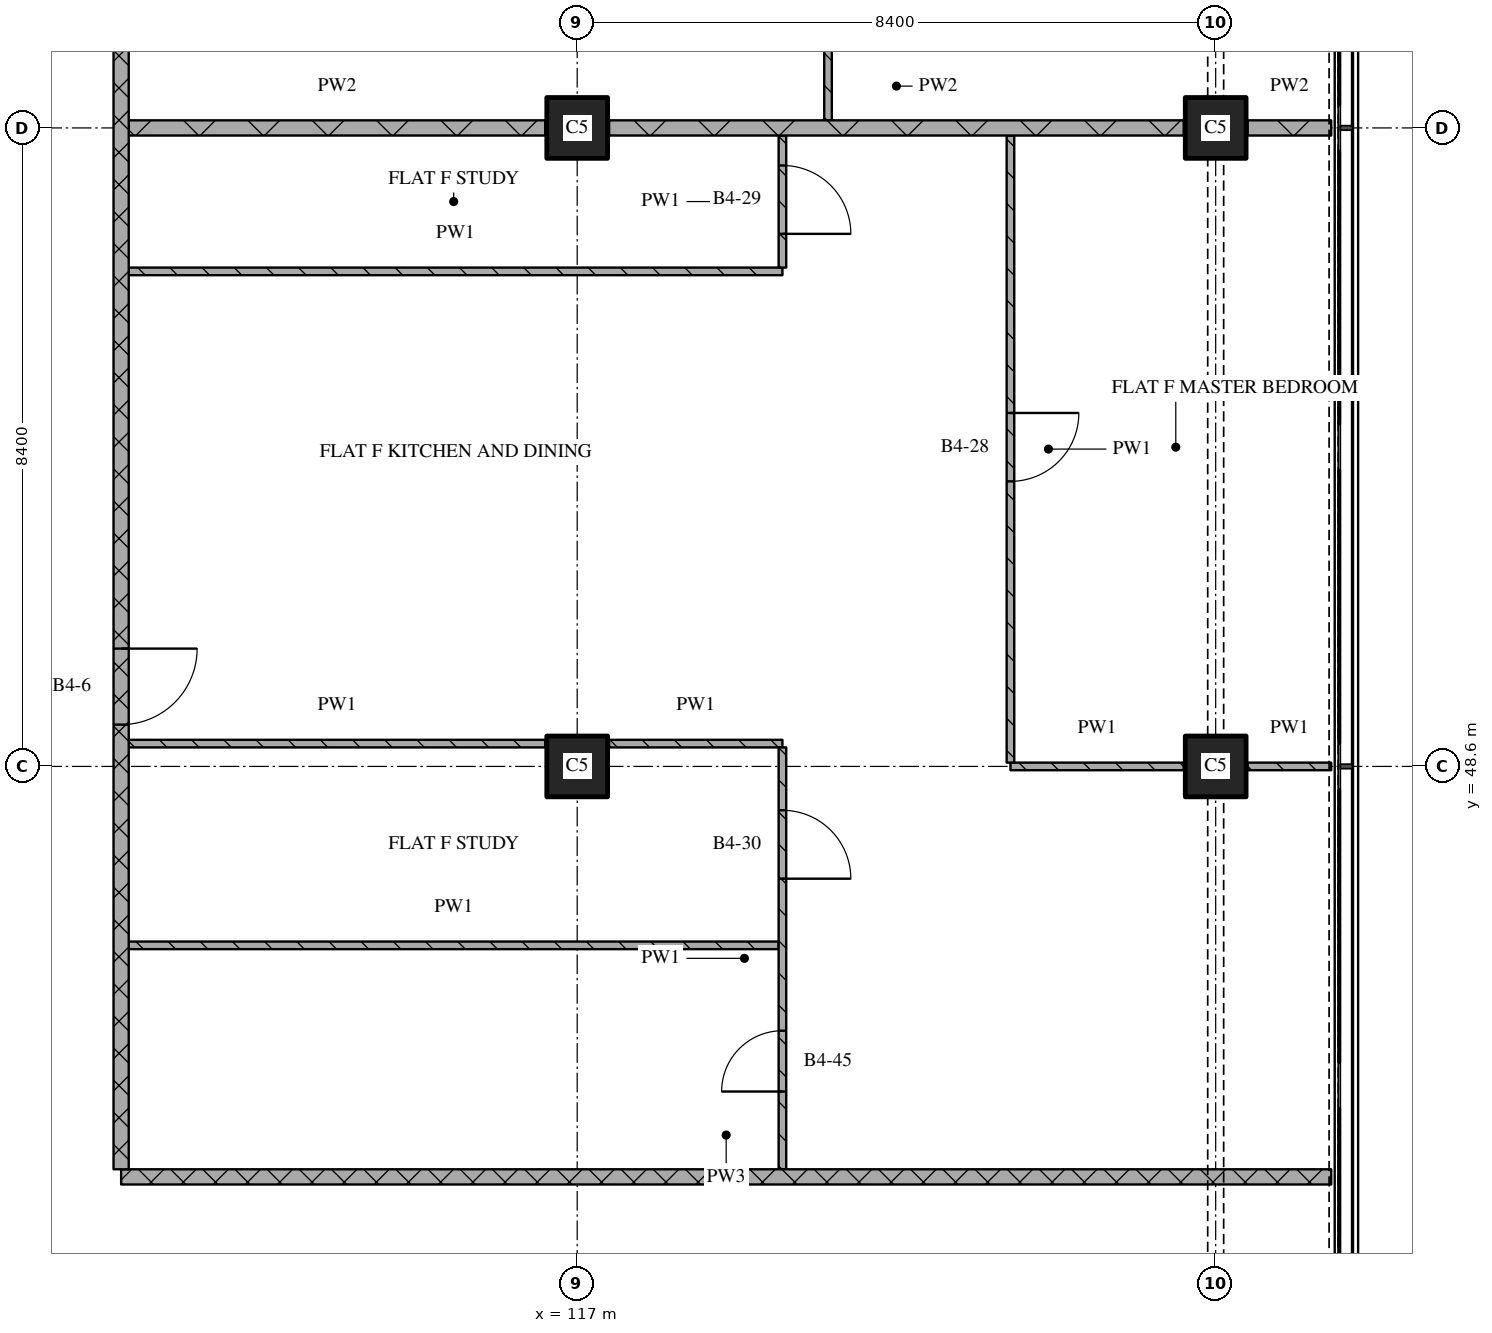
"""IFC4 building model, lengths in metres.
Left out: names, types, materials, properties, quantities, classifications, styles, units other than length and angle.
Written with IfcOpenShell. Run it as: python <this file> out.ifc"""

import sys

from ifc_helpers import new_model, si_unit, direction, frame, frame_2d, origin, origin_2d, place, context, subcontext, project, spatial, rectangle, extrude, element, fill, save


model = new_model("IFC4")
c1 = context("Model", 3, precision=1e-05, world=origin(), true_north=direction((0.0, 1.0)))
c2 = subcontext(c1, "Body", "Model", "MODEL_VIEW")
j1 = project(units=[si_unit("LENGTHUNIT", "METRE"), si_unit("PLANEANGLEUNIT", "RADIAN")], contexts=[c1])
p1 = place(None, origin())
s1 = spatial("IfcSite", under=j1, at=p1, CompositionType="ELEMENT")
p2 = place(p1, origin())
s2 = spatial("IfcBuilding", under=s1, at=p2, CompositionType="ELEMENT")
p3 = place(p2, frame((0.0, 0.0, 134.85)))
s3 = spatial("IfcBuildingStorey", under=s2, at=p3, CompositionType="ELEMENT", Elevation=134.85)
for number, where, z_axis, x_axis in (
    (1, (117.0, 48.6, 0.0), (0.0, 0.0, 1.0), (1.0, 0.0, 0.0)),
    (2, (117.0, 57.0, 0.0), (0.0, 0.0, 1.0), (1.0, 0.0, 0.0)),
    (3, (125.4, 48.6, 0.0), (0.0, 0.0, 1.0), (1.0, 0.0, 0.0)),
    (4, (125.4, 57.0, 0.0), (0.0, 0.0, 1.0), (1.0, 0.0, 0.0)),
):
    element("IfcColumn", number, at=place(p3, frame(where, z_axis=z_axis, x_axis=x_axis)), inside=s3, PredefinedType="COLUMN", context=c2, shape_type="SweptSolid", body=[
        extrude(rectangle(XDim=0.8, YDim=0.8, at=origin_2d()), origin(), (0.0, 0.0, 1.0), 3.6),
    ])
p4 = place(p3, frame((111.0, 43.2, 0.0), z_axis=(0.0, 0.0, 1.0), x_axis=(1.0, 0.0, 0.0)))
e5 = element("IfcWall", 5, at=p4, inside=s3, PredefinedType="PARTITIONING", context=c2, shape_type="SweptSolid", body=[
    extrude(rectangle(XDim=15.92, YDim=0.2, at=frame_2d((7.96, 0.0))), origin(), (0.0, 0.0, 1.0), 3.32),
])
p5 = place(p3, frame((111.1, 46.246, 0.0), z_axis=(0.0, 0.0, 1.0), x_axis=(1.0, 0.0, 0.0)))
e6 = element("IfcWall", 6, at=p5, inside=s3, PredefinedType="PARTITIONING", context=c2, shape_type="SweptSolid", body=[
    extrude(rectangle(XDim=8.55, YDim=0.1, at=frame_2d((4.275, 0.0))), origin(), (0.0, 0.0, 1.0), 3.32),
])
p6 = place(p3, frame((122.7, 48.6, 0.0), z_axis=(0.0, 0.0, 1.0), x_axis=(1.0, 0.0, 0.0)))
e7 = element("IfcWall", 7, at=p6, inside=s3, PredefinedType="PARTITIONING", context=c2, shape_type="SweptSolid", body=[
    extrude(rectangle(XDim=2.28, YDim=0.1, at=frame_2d((1.14, 0.0))), origin(), (0.0, 0.0, 1.0), 3.32),
])
p7 = place(p3, frame((125.82, 48.6, 0.0), z_axis=(0.0, 0.0, 1.0), x_axis=(1.0, 0.0, 0.0)))
e8 = element("IfcWall", 8, at=p7, inside=s3, PredefinedType="PARTITIONING", context=c2, shape_type="SweptSolid", body=[
    extrude(rectangle(XDim=1.1, YDim=0.1, at=frame_2d((0.55, 0.0))), origin(), (0.0, 0.0, 1.0), 3.32),
])
p8 = place(p3, frame((111.1, 48.9, 0.0), z_axis=(0.0, 0.0, 1.0), x_axis=(1.0, 0.0, 0.0)))
e9 = element("IfcWall", 9, at=p8, inside=s3, PredefinedType="PARTITIONING", context=c2, shape_type="SweptSolid", body=[
    extrude(rectangle(XDim=5.48, YDim=0.1, at=frame_2d((2.74, 0.0))), origin(), (0.0, 0.0, 1.0), 3.32),
])
p9 = place(p3, frame((117.42, 48.9, 0.0), z_axis=(0.0, 0.0, 1.0), x_axis=(1.0, 0.0, 0.0)))
e10 = element("IfcWall", 10, at=p9, inside=s3, PredefinedType="PARTITIONING", context=c2, shape_type="SweptSolid", body=[
    extrude(rectangle(XDim=2.28, YDim=0.1, at=frame_2d((1.14, 0.0))), origin(), (0.0, 0.0, 1.0), 3.32),
])
p10 = place(p3, frame((111.1, 55.113, 0.0), z_axis=(0.0, 0.0, 1.0), x_axis=(1.0, 0.0, 0.0)))
e11 = element("IfcWall", 11, at=p10, inside=s3, PredefinedType="PARTITIONING", context=c2, shape_type="SweptSolid", body=[
    extrude(rectangle(XDim=8.6, YDim=0.1, at=frame_2d((4.3, 0.0))), origin(), (0.0, 0.0, 1.0), 3.32),
])
p11 = place(p3, frame((111.1, 57.0, 0.0), z_axis=(0.0, 0.0, 1.0), x_axis=(1.0, 0.0, 0.0)))
e12 = element("IfcWall", 12, at=p11, inside=s3, PredefinedType="PARTITIONING", context=c2, shape_type="SweptSolid", body=[
    extrude(rectangle(XDim=5.48, YDim=0.2, at=frame_2d((2.74, 0.0))), origin(), (0.0, 0.0, 1.0), 3.32),
])
p12 = place(p3, frame((117.42, 57.0, 0.0), z_axis=(0.0, 0.0, 1.0), x_axis=(1.0, 0.0, 0.0)))
e13 = element("IfcWall", 13, at=p12, inside=s3, PredefinedType="PARTITIONING", context=c2, shape_type="SweptSolid", body=[
    extrude(rectangle(XDim=7.56, YDim=0.2, at=frame_2d((3.78, 0.0))), origin(), (0.0, 0.0, 1.0), 3.32),
])
p13 = place(p3, frame((125.82, 57.0, 0.0), z_axis=(0.0, 0.0, 1.0), x_axis=(1.0, 0.0, 0.0)))
e14 = element("IfcWall", 14, at=p13, inside=s3, PredefinedType="PARTITIONING", context=c2, shape_type="SweptSolid", body=[
    extrude(rectangle(XDim=1.1, YDim=0.2, at=frame_2d((0.55, 0.0))), origin(), (0.0, 0.0, 1.0), 3.32),
])
p14 = place(p3, frame((111.0, 75.32, 0.0), z_axis=(0.0, 0.0, 1.0), x_axis=(0.0, -1.0, 0.0)))
e15 = element("IfcWall", 15, at=p14, inside=s3, PredefinedType="PARTITIONING", context=c2, shape_type="SweptSolid", body=[
    extrude(rectangle(XDim=32.02, YDim=0.2, at=frame_2d((16.01, 0.0))), origin(), (0.0, 0.0, 1.0), 3.32),
])
p15 = place(p14, frame((8.67, 0.0, 0.0)))
e16 = element("IfcOpeningElement", 16, at=p15, cuts=e15, PredefinedType="OPENING", context=c2, shape_type="SweptSolid", body=[
    extrude(rectangle(XDim=1.0, YDim=2.1, at=frame_2d((0.5, 1.05))), frame((0.0, 0.11, 0.0), z_axis=(0.0, -1.0, 0.0), x_axis=(1.0, 0.0, 0.0)), (0.0, 0.0, 1.0), 0.22),
])
p16 = place(p14, frame((25.17, 0.0, 0.0)))
e17 = element("IfcOpeningElement", 17, at=p16, cuts=e15, PredefinedType="OPENING", context=c2, shape_type="SweptSolid", body=[
    extrude(rectangle(XDim=1.0, YDim=2.1, at=frame_2d((0.5, 1.05))), frame((0.0, 0.11, 0.0), z_axis=(0.0, -1.0, 0.0), x_axis=(1.0, 0.0, 0.0)), (0.0, 0.0, 1.0), 0.22),
])
p17 = place(p3, frame((119.7, 43.3, 0.0), z_axis=(0.0, 0.0, 1.0), x_axis=(0.0, 1.0, 0.0)))
e18 = element("IfcWall", 18, at=p17, inside=s3, PredefinedType="PARTITIONING", context=c2, shape_type="SweptSolid", body=[
    extrude(rectangle(XDim=5.55, YDim=0.1, at=frame_2d((2.775, 0.0))), origin(), (0.0, 0.0, 1.0), 3.32),
])
p18 = place(p17, frame((1.023, 0.0, 0.0)))
e19 = element("IfcOpeningElement", 19, at=p18, cuts=e18, PredefinedType="OPENING", context=c2, shape_type="SweptSolid", body=[
    extrude(rectangle(XDim=0.8, YDim=2.1, at=frame_2d((0.4, 1.05))), frame((0.0, 0.06, 0.0), z_axis=(0.0, -1.0, 0.0), x_axis=(1.0, 0.0, 0.0)), (0.0, 0.0, 1.0), 0.12),
])
p19 = place(p17, frame((3.823, 0.0, 0.0)))
e20 = element("IfcOpeningElement", 20, at=p19, cuts=e18, PredefinedType="OPENING", context=c2, shape_type="SweptSolid", body=[
    extrude(rectangle(XDim=0.9, YDim=2.1, at=frame_2d((0.45, 1.05))), frame((0.0, 0.06, 0.0), z_axis=(0.0, -1.0, 0.0), x_axis=(1.0, 0.0, 0.0)), (0.0, 0.0, 1.0), 0.12),
])
p20 = place(p3, frame((119.7, 55.163, 0.0), z_axis=(0.0, 0.0, 1.0), x_axis=(0.0, 1.0, 0.0)))
e21 = element("IfcWall", 21, at=p20, inside=s3, PredefinedType="PARTITIONING", context=c2, shape_type="SweptSolid", body=[
    extrude(rectangle(XDim=1.737, YDim=0.1, at=frame_2d((0.869, 0.0))), origin(), (0.0, 0.0, 1.0), 3.32),
])
p21 = place(p20, frame((0.444, 0.0, 0.0)))
e22 = element("IfcOpeningElement", 22, at=p21, cuts=e21, PredefinedType="OPENING", context=c2, shape_type="SweptSolid", body=[
    extrude(rectangle(XDim=0.9, YDim=2.1, at=frame_2d((0.45, 1.05))), frame((0.0, 0.06, 0.0), z_axis=(0.0, -1.0, 0.0), x_axis=(1.0, 0.0, 0.0)), (0.0, 0.0, 1.0), 0.12),
])
p22 = place(p3, frame((120.3, 57.1, 0.0), z_axis=(0.0, 0.0, 1.0), x_axis=(0.0, 1.0, 0.0)))
e23 = element("IfcWall", 23, at=p22, inside=s3, PredefinedType="PARTITIONING", context=c2, shape_type="SweptSolid", body=[
    extrude(rectangle(XDim=8.25, YDim=0.1, at=frame_2d((4.125, 0.0))), origin(), (0.0, 0.0, 1.0), 3.32),
])
p23 = place(p22, frame((0.925, 0.0, 0.0)))
e24 = element("IfcOpeningElement", 24, at=p23, cuts=e23, PredefinedType="OPENING", context=c2, shape_type="SweptSolid", body=[
    extrude(rectangle(XDim=0.8, YDim=2.1, at=frame_2d((0.4, 1.05))), frame((0.0, 0.06, 0.0), z_axis=(0.0, -1.0, 0.0), x_axis=(1.0, 0.0, 0.0)), (0.0, 0.0, 1.0), 0.12),
])
p24 = place(p22, frame((3.774, 0.0, 0.0)))
e25 = element("IfcOpeningElement", 25, at=p24, cuts=e23, PredefinedType="OPENING", context=c2, shape_type="SweptSolid", body=[
    extrude(rectangle(XDim=0.8, YDim=2.1, at=frame_2d((0.4, 1.05))), frame((0.0, 0.06, 0.0), z_axis=(0.0, -1.0, 0.0), x_axis=(1.0, 0.0, 0.0)), (0.0, 0.0, 1.0), 0.12),
])
p25 = place(p22, frame((6.5, 0.0, 0.0)))
e26 = element("IfcOpeningElement", 26, at=p25, cuts=e23, PredefinedType="OPENING", context=c2, shape_type="SweptSolid", body=[
    extrude(rectangle(XDim=0.9, YDim=2.1, at=frame_2d((0.45, 1.05))), frame((0.0, 0.06, 0.0), z_axis=(0.0, -1.0, 0.0), x_axis=(1.0, 0.0, 0.0)), (0.0, 0.0, 1.0), 0.12),
])
p26 = place(p3, frame((122.7, 56.9, 0.0), z_axis=(0.0, 0.0, 1.0), x_axis=(0.0, -1.0, 0.0)))
e27 = element("IfcWall", 27, at=p26, inside=s3, PredefinedType="PARTITIONING", context=c2, shape_type="SweptSolid", body=[
    extrude(rectangle(XDim=8.25, YDim=0.1, at=frame_2d((4.125, 0.0))), origin(), (0.0, 0.0, 1.0), 3.32),
])
p27 = place(p26, frame((3.65, 0.0, 0.0)))
e28 = element("IfcOpeningElement", 28, at=p27, cuts=e27, PredefinedType="OPENING", context=c2, shape_type="SweptSolid", body=[
    extrude(rectangle(XDim=0.9, YDim=2.1, at=frame_2d((0.45, 1.05))), frame((0.0, 0.06, 0.0), z_axis=(0.0, -1.0, 0.0), x_axis=(1.0, 0.0, 0.0)), (0.0, 0.0, 1.0), 0.12),
])
p28 = place(p16, origin())
e29 = element("IfcDoor", 29, at=p28, inside=s3, OperationType="SINGLE_SWING_LEFT", PredefinedType="DOOR", context=c2, shape_type="SweptSolid", body=[
    extrude(rectangle(XDim=1.0, YDim=2.1, at=frame_2d((0.5, 1.05))), frame((0.0, 0.025, 0.0), z_axis=(0.0, -1.0, 0.0), x_axis=(1.0, 0.0, 0.0)), (0.0, 0.0, 1.0), 0.05),
])
fill(e17, e29)
p29 = place(p18, origin())
e30 = element("IfcDoor", 30, at=p29, inside=s3, OperationType="SINGLE_SWING_LEFT", PredefinedType="DOOR", context=c2, shape_type="SweptSolid", body=[
    extrude(rectangle(XDim=0.8, YDim=2.1, at=frame_2d((0.4, 1.05))), frame((0.0, 0.025, 0.0), z_axis=(0.0, -1.0, 0.0), x_axis=(1.0, 0.0, 0.0)), (0.0, 0.0, 1.0), 0.05),
])
fill(e19, e30)
p30 = place(p19, origin())
e31 = element("IfcDoor", 31, at=p30, inside=s3, OperationType="SINGLE_SWING_RIGHT", PredefinedType="DOOR", context=c2, shape_type="SweptSolid", body=[
    extrude(rectangle(XDim=0.9, YDim=2.1, at=frame_2d((0.45, 1.05))), frame((0.0, 0.025, 0.0), z_axis=(0.0, -1.0, 0.0), x_axis=(1.0, 0.0, 0.0)), (0.0, 0.0, 1.0), 0.05),
])
fill(e20, e31)
p31 = place(p21, origin())
e32 = element("IfcDoor", 32, at=p31, inside=s3, OperationType="SINGLE_SWING_RIGHT", PredefinedType="DOOR", context=c2, shape_type="SweptSolid", body=[
    extrude(rectangle(XDim=0.9, YDim=2.1, at=frame_2d((0.45, 1.05))), frame((0.0, 0.025, 0.0), z_axis=(0.0, -1.0, 0.0), x_axis=(1.0, 0.0, 0.0)), (0.0, 0.0, 1.0), 0.05),
])
fill(e22, e32)
p32 = place(p27, origin())
e33 = element("IfcDoor", 33, at=p32, inside=s3, OperationType="SINGLE_SWING_LEFT", PredefinedType="DOOR", context=c2, shape_type="SweptSolid", body=[
    extrude(rectangle(XDim=0.9, YDim=2.1, at=frame_2d((0.45, 1.05))), frame((0.0, 0.025, 0.0), z_axis=(0.0, -1.0, 0.0), x_axis=(1.0, 0.0, 0.0)), (0.0, 0.0, 1.0), 0.05),
])
fill(e28, e33)
save(model, sys.argv[1])
